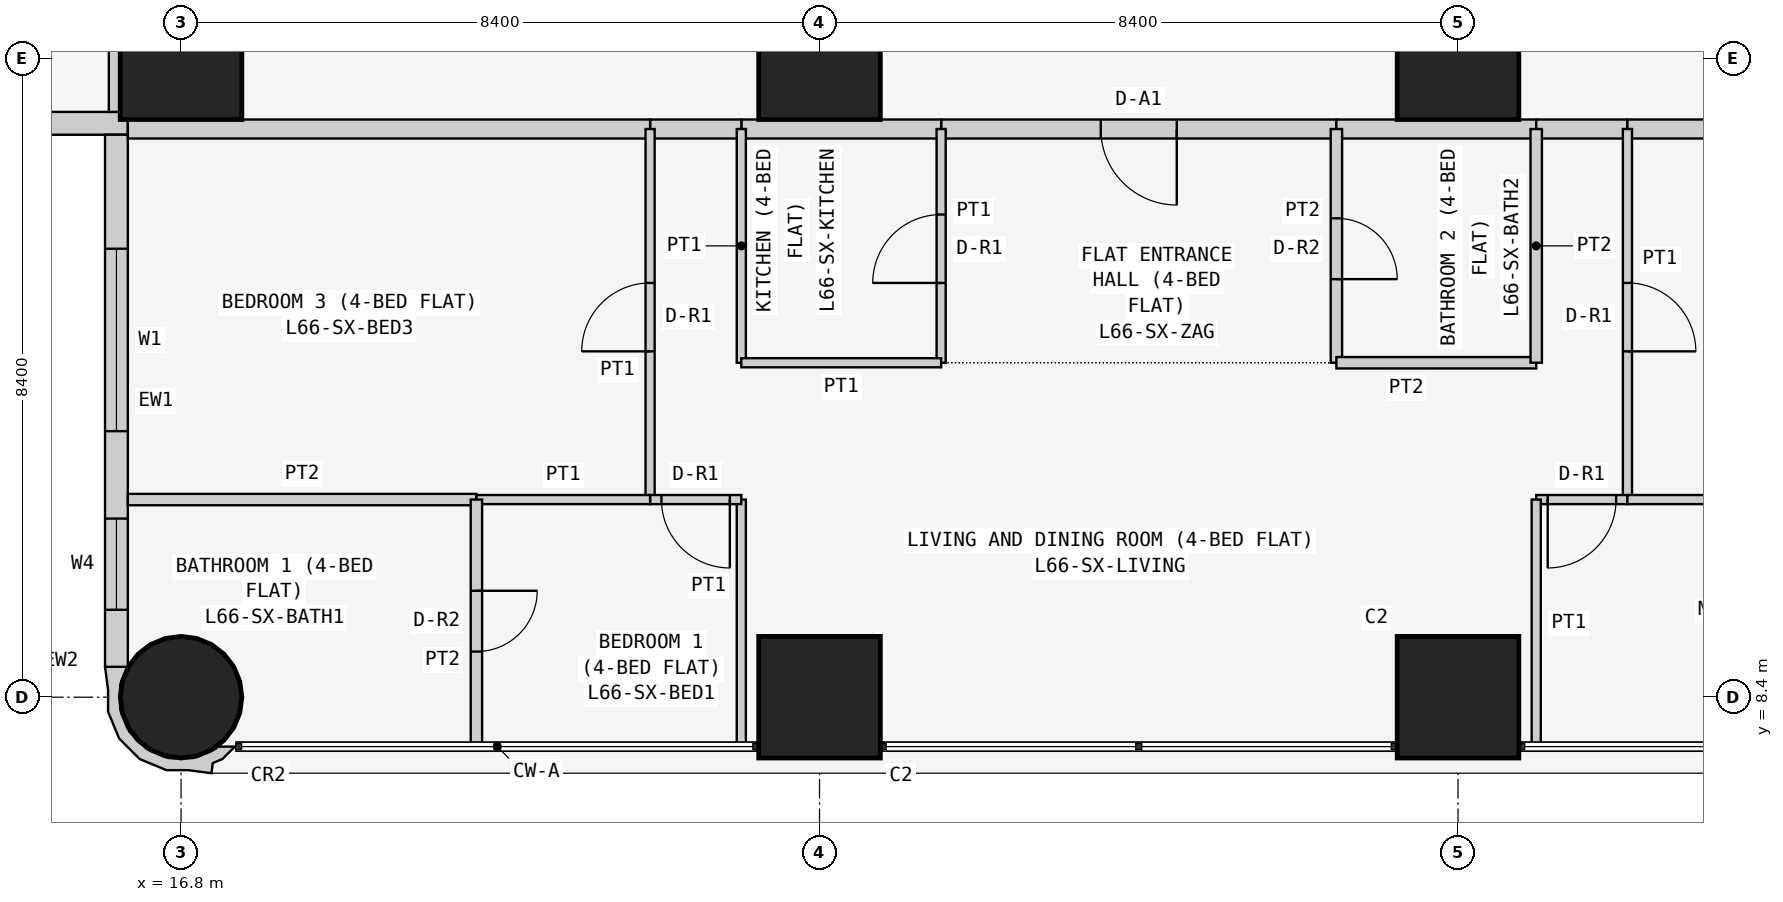
"""IFC4 building model, lengths in metres.
Left out: names, types, materials, properties, quantities, classifications, styles, units other than length and angle.
Written with IfcOpenShell. Run it as: python <this file> out.ifc"""

import sys

from ifc_helpers import new_model, si_unit, direction, frame, frame_2d, origin, origin_2d, place, context, subcontext, project, spatial, polyline, rectangle, circle, outline, extrude, element, fill, save


model = new_model("IFC4")
c1 = context("Model", 3, precision=1e-05, world=origin(), true_north=direction((0.0, 1.0)))
c2 = subcontext(c1, "Body", "Model", "MODEL_VIEW")
j1 = project(units=[si_unit("LENGTHUNIT", "METRE"), si_unit("PLANEANGLEUNIT", "RADIAN")], contexts=[c1])
p1 = place(None, origin())
s1 = spatial("IfcSite", under=j1, at=p1, CompositionType="ELEMENT")
p2 = place(p1, origin())
s2 = spatial("IfcBuilding", under=s1, at=p2, CompositionType="ELEMENT")
p3 = place(p2, frame((0.0, 0.0, 254.1)))
s3 = spatial("IfcBuildingStorey", under=s2, at=p3, CompositionType="ELEMENT", Elevation=254.1)
p4 = place(p3, frame((16.8, 8.4, 0.0), z_axis=(0.0, 0.0, 1.0), x_axis=(1.0, 0.0, 0.0)))
e1 = element("IfcColumn", 1, at=p4, inside=s3, PredefinedType="COLUMN", context=c2, shape_type="SweptSolid", body=[
    extrude(circle(Radius=0.8, at=origin_2d()), origin(), (0.0, 0.0, 1.0), 3.6),
])
for number, where, z_axis, x_axis in (
    (2, (16.8, 16.8, 0.0), (0.0, 0.0, 1.0), (1.0, 0.0, 0.0)),
    (3, (25.2, 8.4, 0.0), (0.0, 0.0, 1.0), (1.0, 0.0, 0.0)),
    (4, (25.2, 16.8, 0.0), (0.0, 0.0, 1.0), (1.0, 0.0, 0.0)),
    (5, (33.6, 8.4, 0.0), (0.0, 0.0, 1.0), (1.0, 0.0, 0.0)),
    (6, (33.6, 16.8, 0.0), (0.0, 0.0, 1.0), (1.0, 0.0, 0.0)),
):
    element("IfcColumn", number, at=place(p3, frame(where, z_axis=z_axis, x_axis=x_axis)), inside=s3, PredefinedType="COLUMN", context=c2, shape_type="SweptSolid", body=[
        extrude(rectangle(XDim=1.6, YDim=1.6, at=origin_2d()), origin(), (0.0, 0.0, 1.0), 3.6),
    ])
p5 = place(p3, frame((8.8, 15.95, 0.0), z_axis=(0.0, 0.0, 1.0), x_axis=(1.0, 0.0, 0.0)))
e7 = element("IfcWall", 7, at=p5, inside=s3, PredefinedType="SOLIDWALL", context=c2, shape_type="SweptSolid", body=[
    extrude(rectangle(XDim=7.3, YDim=0.3, at=frame_2d((3.65, 0.0))), origin(), (0.0, 0.0, 1.0), 3.45),
])
p6 = place(p5, frame((3.1, 0.0, 0.9)))
e8 = element("IfcOpeningElement", 8, at=p6, cuts=e7, PredefinedType="OPENING", context=c2, shape_type="SweptSolid", body=[
    extrude(rectangle(XDim=2.4, YDim=1.5, at=frame_2d((1.2, 0.75))), frame((0.0, 0.16, 0.0), z_axis=(0.0, -1.0, 0.0), x_axis=(1.0, 0.0, 0.0)), (0.0, 0.0, 1.0), 0.32),
])
p7 = place(p5, frame((0.75, 0.0, 0.9)))
e9 = element("IfcOpeningElement", 9, at=p7, cuts=e7, PredefinedType="OPENING", context=c2, shape_type="SweptSolid", body=[
    extrude(rectangle(XDim=1.2, YDim=1.5, at=frame_2d((0.6, 0.75))), frame((0.0, 0.16, 0.0), z_axis=(0.0, -1.0, 0.0), x_axis=(1.0, 0.0, 0.0)), (0.0, 0.0, 1.0), 0.32),
])
p8 = place(p3, frame((15.95, 15.8, 0.0), z_axis=(0.0, 0.0, 1.0), x_axis=(0.0, -1.0, 0.0)))
e10 = element("IfcWall", 10, at=p8, inside=s3, PredefinedType="SOLIDWALL", context=c2, shape_type="SweptSolid", body=[
    extrude(rectangle(XDim=7.0, YDim=0.3, at=frame_2d((3.5, 0.0))), origin(), (0.0, 0.0, 1.0), 3.45),
])
p9 = place(p8, frame((1.5, 0.0, 0.9)))
e11 = element("IfcOpeningElement", 11, at=p9, cuts=e10, PredefinedType="OPENING", context=c2, shape_type="SweptSolid", body=[
    extrude(rectangle(XDim=2.4, YDim=1.5, at=frame_2d((1.2, 0.75))), frame((0.0, 0.16, 0.0), z_axis=(0.0, -1.0, 0.0), x_axis=(1.0, 0.0, 0.0)), (0.0, 0.0, 1.0), 0.32),
])
p10 = place(p8, frame((5.05, 0.0, 0.9)))
e12 = element("IfcOpeningElement", 12, at=p10, cuts=e10, PredefinedType="OPENING", context=c2, shape_type="SweptSolid", body=[
    extrude(rectangle(XDim=1.2, YDim=1.5, at=frame_2d((0.6, 0.75))), frame((0.0, 0.16, 0.0), z_axis=(0.0, -1.0, 0.0), x_axis=(1.0, 0.0, 0.0)), (0.0, 0.0, 1.0), 0.32),
])
p11 = place(p3, frame((15.983, 8.727, 0.0), z_axis=(0.0, 0.0, 1.0), x_axis=(-0.343276641956, -0.93923434088, 0.0)))
e13 = element("IfcWall", 13, at=p11, inside=s3, PredefinedType="SOLIDWALL", context=c2, shape_type="SweptSolid", body=[
    extrude(outline(polyline([(0.829, 1.599), (0.697, 1.569), (0.604, 1.67), (0.394, 1.767), (0.471, 1.556), (0.509, 1.539), (0.724, 1.304), (0.833, 1.005), (0.82, 0.686), (0.686, 0.397), (0.451, 0.182), (0.152, 0.073), (-0.116, 0.084), (-0.127, 0.078), (-0.146, 0.071), (-0.006, -0.197), (0.266, -0.055), (0.535, 0.044), (0.817, 0.302), (0.978, 0.648), (0.994, 1.03), (0.895, 1.3), (0.829, 1.599)])), origin(), (0.0, 0.0, 1.0), 3.45),
])
p12 = place(p3, frame((32.0, 15.875, 0.0), z_axis=(0.0, 0.0, 1.0), x_axis=(-1.0, 0.0, 0.0)))
e14 = element("IfcWall", 14, at=p12, inside=s3, PredefinedType="PARTITIONING", context=c2, shape_type="SweptSolid", body=[
    extrude(rectangle(XDim=5.2, YDim=0.25, at=frame_2d((2.6, 0.0))), origin(), (0.0, 0.0, 1.0), 3.45),
])
p13 = place(p12, frame((2.1, 0.0, 0.0)))
e15 = element("IfcOpeningElement", 15, at=p13, cuts=e14, PredefinedType="OPENING", context=c2, shape_type="SweptSolid", body=[
    extrude(rectangle(XDim=1.0, YDim=2.1, at=frame_2d((0.5, 1.05))), frame((0.0, 0.135, 0.0), z_axis=(0.0, -1.0, 0.0), x_axis=(1.0, 0.0, 0.0)), (0.0, 0.0, 1.0), 0.27),
])
p14 = place(p3, frame((34.629, 15.875, 0.0), z_axis=(0.0, 0.0, 1.0), x_axis=(-1.0, 0.0, 0.0)))
e16 = element("IfcWall", 16, at=p14, inside=s3, PredefinedType="PARTITIONING", context=c2, shape_type="SweptSolid", body=[
    extrude(rectangle(XDim=2.629, YDim=0.25, at=frame_2d((1.314, 0.0))), origin(), (0.0, 0.0, 1.0), 3.45),
])
p15 = place(p3, frame((26.8, 15.875, 0.0), z_axis=(0.0, 0.0, 1.0), x_axis=(-1.0, 0.0, 0.0)))
e17 = element("IfcWall", 17, at=p15, inside=s3, PredefinedType="PARTITIONING", context=c2, shape_type="SweptSolid", body=[
    extrude(rectangle(XDim=2.629, YDim=0.25, at=frame_2d((1.314, 0.0))), origin(), (0.0, 0.0, 1.0), 3.45),
])
p16 = place(p3, frame((24.171, 15.875, 0.0), z_axis=(0.0, 0.0, 1.0), x_axis=(-1.0, 0.0, 0.0)))
e18 = element("IfcWall", 18, at=p16, inside=s3, PredefinedType="PARTITIONING", context=c2, shape_type="SweptSolid", body=[
    extrude(rectangle(XDim=1.2, YDim=0.25, at=frame_2d((0.6, 0.0))), origin(), (0.0, 0.0, 1.0), 3.45),
])
p17 = place(p3, frame((35.829, 15.875, 0.0), z_axis=(0.0, 0.0, 1.0), x_axis=(-1.0, 0.0, 0.0)))
e19 = element("IfcWall", 19, at=p17, inside=s3, PredefinedType="PARTITIONING", context=c2, shape_type="SweptSolid", body=[
    extrude(rectangle(XDim=1.2, YDim=0.25, at=frame_2d((0.6, 0.0))), origin(), (0.0, 0.0, 1.0), 3.45),
])
for number, where, z_axis, x_axis in (
    (20, (42.7, 15.875, 0.0), (0.0, 0.0, 1.0), (-1.0, 0.0, 0.0)),
    (21, (22.971, 15.875, 0.0), (0.0, 0.0, 1.0), (-1.0, 0.0, 0.0)),
):
    element("IfcWall", number, at=place(p3, frame(where, z_axis=z_axis, x_axis=x_axis)), inside=s3, PredefinedType="PARTITIONING", context=c2, shape_type="SweptSolid", body=[
        extrude(rectangle(XDim=6.871, YDim=0.25, at=frame_2d((3.436, 0.0))), origin(), (0.0, 0.0, 1.0), 3.45),
    ])
p18 = place(p3, frame((15.925, 16.1, 0.0), z_axis=(0.0, 0.0, 1.0), x_axis=(0.0, 1.0, 0.0)))
e22 = element("IfcWall", 22, at=p18, inside=s3, PredefinedType="PARTITIONING", context=c2, shape_type="SweptSolid", body=[
    extrude(rectangle(XDim=11.557, YDim=0.15, at=frame_2d((5.778, 0.0))), origin(), (0.0, 0.0, 1.0), 3.45),
])
p19 = place(p3, frame((32.0, 12.8, 0.0), z_axis=(0.0, 0.0, 1.0), x_axis=(0.0, 1.0, 0.0)))
e23 = element("IfcWall", 23, at=p19, inside=s3, PredefinedType="PARTITIONING", context=c2, shape_type="SweptSolid", body=[
    extrude(rectangle(XDim=3.075, YDim=0.15, at=frame_2d((1.538, 0.0))), origin(), (0.0, 0.0, 1.0), 3.45),
])
p20 = place(p19, frame((1.1, 0.0, 0.0)))
e24 = element("IfcOpeningElement", 24, at=p20, cuts=e23, PredefinedType="OPENING", context=c2, shape_type="SweptSolid", body=[
    extrude(rectangle(XDim=0.8, YDim=2.1, at=frame_2d((0.4, 1.05))), frame((0.0, 0.085, 0.0), z_axis=(0.0, -1.0, 0.0), x_axis=(1.0, 0.0, 0.0)), (0.0, 0.0, 1.0), 0.17),
])
p21 = place(p3, frame((26.8, 15.875, 0.0), z_axis=(0.0, 0.0, 1.0), x_axis=(0.0, -1.0, 0.0)))
e25 = element("IfcWall", 25, at=p21, inside=s3, PredefinedType="PARTITIONING", context=c2, shape_type="SweptSolid", body=[
    extrude(rectangle(XDim=3.075, YDim=0.12, at=frame_2d((1.538, 0.0))), origin(), (0.0, 0.0, 1.0), 3.45),
])
p22 = place(p21, frame((1.125, 0.0, 0.0)))
e26 = element("IfcOpeningElement", 26, at=p22, cuts=e25, PredefinedType="OPENING", context=c2, shape_type="SweptSolid", body=[
    extrude(rectangle(XDim=0.9, YDim=2.1, at=frame_2d((0.45, 1.05))), frame((0.0, 0.07, 0.0), z_axis=(0.0, -1.0, 0.0), x_axis=(1.0, 0.0, 0.0)), (0.0, 0.0, 1.0), 0.14),
])
p23 = place(p3, frame((32.0, 12.8, 0.0), z_axis=(0.0, 0.0, 1.0), x_axis=(1.0, 0.0, 0.0)))
e27 = element("IfcWall", 27, at=p23, inside=s3, PredefinedType="PARTITIONING", context=c2, shape_type="SweptSolid", body=[
    extrude(rectangle(XDim=2.629, YDim=0.15, at=frame_2d((1.314, 0.0))), origin(), (0.0, 0.0, 1.0), 3.45),
])
p24 = place(p3, frame((34.629, 12.8, 0.0), z_axis=(0.0, 0.0, 1.0), x_axis=(0.0, 1.0, 0.0)))
e28 = element("IfcWall", 28, at=p24, inside=s3, PredefinedType="PARTITIONING", context=c2, shape_type="SweptSolid", body=[
    extrude(rectangle(XDim=3.075, YDim=0.15, at=frame_2d((1.538, 0.0))), origin(), (0.0, 0.0, 1.0), 3.45),
])
p25 = place(p3, frame((24.171, 15.875, 0.0), z_axis=(0.0, 0.0, 1.0), x_axis=(0.0, -1.0, 0.0)))
e29 = element("IfcWall", 29, at=p25, inside=s3, PredefinedType="PARTITIONING", context=c2, shape_type="SweptSolid", body=[
    extrude(rectangle(XDim=3.075, YDim=0.12, at=frame_2d((1.538, 0.0))), origin(), (0.0, 0.0, 1.0), 3.45),
])
p26 = place(p3, frame((24.171, 12.8, 0.0), z_axis=(0.0, 0.0, 1.0), x_axis=(1.0, 0.0, 0.0)))
e30 = element("IfcWall", 30, at=p26, inside=s3, PredefinedType="PARTITIONING", context=c2, shape_type="SweptSolid", body=[
    extrude(rectangle(XDim=2.629, YDim=0.12, at=frame_2d((1.314, 0.0))), origin(), (0.0, 0.0, 1.0), 3.45),
])
p27 = place(p3, frame((35.829, 15.875, 0.0), z_axis=(0.0, 0.0, 1.0), x_axis=(0.0, -1.0, 0.0)))
e31 = element("IfcWall", 31, at=p27, inside=s3, PredefinedType="PARTITIONING", context=c2, shape_type="SweptSolid", body=[
    extrude(rectangle(XDim=4.875, YDim=0.12, at=frame_2d((2.438, 0.0))), origin(), (0.0, 0.0, 1.0), 3.45),
])
p28 = place(p27, frame((2.025, 0.0, 0.0)))
e32 = element("IfcOpeningElement", 32, at=p28, cuts=e31, PredefinedType="OPENING", context=c2, shape_type="SweptSolid", body=[
    extrude(rectangle(XDim=0.9, YDim=2.1, at=frame_2d((0.45, 1.05))), frame((0.0, 0.07, 0.0), z_axis=(0.0, -1.0, 0.0), x_axis=(1.0, 0.0, 0.0)), (0.0, 0.0, 1.0), 0.14),
])
p29 = place(p3, frame((35.829, 11.0, 0.0), z_axis=(0.0, 0.0, 1.0), x_axis=(-1.0, 0.0, 0.0)))
e33 = element("IfcWall", 33, at=p29, inside=s3, PredefinedType="PARTITIONING", context=c2, shape_type="SweptSolid", body=[
    extrude(rectangle(XDim=1.2, YDim=0.12, at=frame_2d((0.6, 0.0))), origin(), (0.0, 0.0, 1.0), 3.45),
])
p30 = place(p29, frame((0.149, 0.0, 0.0)))
e34 = element("IfcOpeningElement", 34, at=p30, cuts=e33, PredefinedType="OPENING", context=c2, shape_type="SweptSolid", body=[
    extrude(rectangle(XDim=0.9, YDim=2.1, at=frame_2d((0.45, 1.05))), frame((0.0, 0.07, 0.0), z_axis=(0.0, -1.0, 0.0), x_axis=(1.0, 0.0, 0.0)), (0.0, 0.0, 1.0), 0.14),
])
p31 = place(p3, frame((34.629, 11.0, 0.0), z_axis=(0.0, 0.0, 1.0), x_axis=(0.0, -1.0, 0.0)))
e35 = element("IfcWall", 35, at=p31, inside=s3, PredefinedType="PARTITIONING", context=c2, shape_type="SweptSolid", body=[
    extrude(rectangle(XDim=3.25, YDim=0.12, at=frame_2d((1.625, 0.0))), origin(), (0.0, 0.0, 1.0), 3.45),
])
p32 = place(p3, frame((22.971, 11.0, 0.0), z_axis=(0.0, 0.0, 1.0), x_axis=(0.0, 1.0, 0.0)))
e36 = element("IfcWall", 36, at=p32, inside=s3, PredefinedType="PARTITIONING", context=c2, shape_type="SweptSolid", body=[
    extrude(rectangle(XDim=4.875, YDim=0.12, at=frame_2d((2.438, 0.0))), origin(), (0.0, 0.0, 1.0), 3.45),
])
p33 = place(p32, frame((1.95, 0.0, 0.0)))
e37 = element("IfcOpeningElement", 37, at=p33, cuts=e36, PredefinedType="OPENING", context=c2, shape_type="SweptSolid", body=[
    extrude(rectangle(XDim=0.9, YDim=2.1, at=frame_2d((0.45, 1.05))), frame((0.0, 0.07, 0.0), z_axis=(0.0, -1.0, 0.0), x_axis=(1.0, 0.0, 0.0)), (0.0, 0.0, 1.0), 0.14),
])
p34 = place(p3, frame((24.171, 7.75, 0.0), z_axis=(0.0, 0.0, 1.0), x_axis=(0.0, 1.0, 0.0)))
e38 = element("IfcWall", 38, at=p34, inside=s3, PredefinedType="PARTITIONING", context=c2, shape_type="SweptSolid", body=[
    extrude(rectangle(XDim=3.25, YDim=0.12, at=frame_2d((1.625, 0.0))), origin(), (0.0, 0.0, 1.0), 3.45),
])
p35 = place(p3, frame((24.171, 11.0, 0.0), z_axis=(0.0, 0.0, 1.0), x_axis=(-1.0, 0.0, 0.0)))
e39 = element("IfcWall", 39, at=p35, inside=s3, PredefinedType="PARTITIONING", context=c2, shape_type="SweptSolid", body=[
    extrude(rectangle(XDim=1.2, YDim=0.12, at=frame_2d((0.6, 0.0))), origin(), (0.0, 0.0, 1.0), 3.45),
])
p36 = place(p35, frame((0.151, 0.0, 0.0)))
e40 = element("IfcOpeningElement", 40, at=p36, cuts=e39, PredefinedType="OPENING", context=c2, shape_type="SweptSolid", body=[
    extrude(rectangle(XDim=0.9, YDim=2.1, at=frame_2d((0.45, 1.05))), frame((0.0, 0.07, 0.0), z_axis=(0.0, -1.0, 0.0), x_axis=(1.0, 0.0, 0.0)), (0.0, 0.0, 1.0), 0.14),
])
p37 = place(p3, frame((35.829, 11.0, 0.0), z_axis=(0.0, 0.0, 1.0), x_axis=(1.0, 0.0, 0.0)))
e41 = element("IfcWall", 41, at=p37, inside=s3, PredefinedType="PARTITIONING", context=c2, shape_type="SweptSolid", body=[
    extrude(rectangle(XDim=6.871, YDim=0.12, at=frame_2d((3.436, 0.0))), origin(), (0.0, 0.0, 1.0), 3.45),
])
p38 = place(p3, frame((16.1, 11.0, 0.0), z_axis=(0.0, 0.0, 1.0), x_axis=(1.0, 0.0, 0.0)))
e42 = element("IfcWall", 42, at=p38, inside=s3, PredefinedType="PARTITIONING", context=c2, shape_type="SweptSolid", body=[
    extrude(rectangle(XDim=4.586, YDim=0.15, at=frame_2d((2.293, 0.0))), origin(), (0.0, 0.0, 1.0), 3.45),
])
p39 = place(p3, frame((20.686, 11.0, 0.0), z_axis=(0.0, 0.0, 1.0), x_axis=(1.0, 0.0, 0.0)))
e43 = element("IfcWall", 43, at=p39, inside=s3, PredefinedType="PARTITIONING", context=c2, shape_type="SweptSolid", body=[
    extrude(rectangle(XDim=2.285, YDim=0.12, at=frame_2d((1.143, 0.0))), origin(), (0.0, 0.0, 1.0), 3.45),
])
p40 = place(p3, frame((20.686, 7.75, 0.0), z_axis=(0.0, 0.0, 1.0), x_axis=(0.0, 1.0, 0.0)))
e44 = element("IfcWall", 44, at=p40, inside=s3, PredefinedType="PARTITIONING", context=c2, shape_type="SweptSolid", body=[
    extrude(rectangle(XDim=3.25, YDim=0.15, at=frame_2d((1.625, 0.0))), origin(), (0.0, 0.0, 1.0), 3.45),
])
p41 = place(p40, frame((1.25, 0.0, 0.0)))
e45 = element("IfcOpeningElement", 45, at=p41, cuts=e44, PredefinedType="OPENING", context=c2, shape_type="SweptSolid", body=[
    extrude(rectangle(XDim=0.8, YDim=2.1, at=frame_2d((0.4, 1.05))), frame((0.0, 0.085, 0.0), z_axis=(0.0, -1.0, 0.0), x_axis=(1.0, 0.0, 0.0)), (0.0, 0.0, 1.0), 0.17),
])
p42 = place(p9, origin())
e46 = element("IfcWindow", 46, at=p42, inside=s3, PartitioningType="SINGLE_PANEL", PredefinedType="WINDOW", context=c2, shape_type="SweptSolid", body=[
    extrude(rectangle(XDim=2.4, YDim=1.5, at=frame_2d((1.2, 0.75))), frame((0.0, 0.03, 0.0), z_axis=(0.0, -1.0, 0.0), x_axis=(1.0, 0.0, 0.0)), (0.0, 0.0, 1.0), 0.06),
])
fill(e11, e46)
p43 = place(p10, origin())
e47 = element("IfcWindow", 47, at=p43, inside=s3, PartitioningType="SINGLE_PANEL", PredefinedType="WINDOW", context=c2, shape_type="SweptSolid", body=[
    extrude(rectangle(XDim=1.2, YDim=1.5, at=frame_2d((0.6, 0.75))), frame((0.0, 0.03, 0.0), z_axis=(0.0, -1.0, 0.0), x_axis=(1.0, 0.0, 0.0)), (0.0, 0.0, 1.0), 0.06),
])
fill(e12, e47)
p44 = place(p13, origin())
e48 = element("IfcDoor", 48, at=p44, inside=s3, OperationType="SINGLE_SWING_LEFT", PredefinedType="DOOR", context=c2, shape_type="SweptSolid", body=[
    extrude(rectangle(XDim=1.0, YDim=2.1, at=frame_2d((0.5, 1.05))), frame((0.0, 0.025, 0.0), z_axis=(0.0, -1.0, 0.0), x_axis=(1.0, 0.0, 0.0)), (0.0, 0.0, 1.0), 0.05),
])
fill(e15, e48)
p45 = place(p20, frame((0.8, 0.0, 0.0), z_axis=(0.0, 0.0, 1.0), x_axis=(-1.0, 0.0, 0.0)))
e49 = element("IfcDoor", 49, at=p45, inside=s3, OperationType="SINGLE_SWING_RIGHT", PredefinedType="DOOR", context=c2, shape_type="SweptSolid", body=[
    extrude(rectangle(XDim=0.8, YDim=2.1, at=frame_2d((0.4, 1.05))), frame((0.0, 0.025, 0.0), z_axis=(0.0, -1.0, 0.0), x_axis=(1.0, 0.0, 0.0)), (0.0, 0.0, 1.0), 0.05),
])
fill(e24, e49)
p46 = place(p22, frame((0.9, 0.0, 0.0), z_axis=(0.0, 0.0, 1.0), x_axis=(-1.0, 0.0, 0.0)))
e50 = element("IfcDoor", 50, at=p46, inside=s3, OperationType="SINGLE_SWING_LEFT", PredefinedType="DOOR", context=c2, shape_type="SweptSolid", body=[
    extrude(rectangle(XDim=0.9, YDim=2.1, at=frame_2d((0.45, 1.05))), frame((0.0, 0.025, 0.0), z_axis=(0.0, -1.0, 0.0), x_axis=(1.0, 0.0, 0.0)), (0.0, 0.0, 1.0), 0.05),
])
fill(e26, e50)
p47 = place(p28, origin())
e51 = element("IfcDoor", 51, at=p47, inside=s3, OperationType="SINGLE_SWING_RIGHT", PredefinedType="DOOR", context=c2, shape_type="SweptSolid", body=[
    extrude(rectangle(XDim=0.9, YDim=2.1, at=frame_2d((0.45, 1.05))), frame((0.0, 0.025, 0.0), z_axis=(0.0, -1.0, 0.0), x_axis=(1.0, 0.0, 0.0)), (0.0, 0.0, 1.0), 0.05),
])
fill(e32, e51)
p48 = place(p30, origin())
e52 = element("IfcDoor", 52, at=p48, inside=s3, OperationType="SINGLE_SWING_RIGHT", PredefinedType="DOOR", context=c2, shape_type="SweptSolid", body=[
    extrude(rectangle(XDim=0.9, YDim=2.1, at=frame_2d((0.45, 1.05))), frame((0.0, 0.025, 0.0), z_axis=(0.0, -1.0, 0.0), x_axis=(1.0, 0.0, 0.0)), (0.0, 0.0, 1.0), 0.05),
])
fill(e34, e52)
p49 = place(p33, origin())
e53 = element("IfcDoor", 53, at=p49, inside=s3, OperationType="SINGLE_SWING_LEFT", PredefinedType="DOOR", context=c2, shape_type="SweptSolid", body=[
    extrude(rectangle(XDim=0.9, YDim=2.1, at=frame_2d((0.45, 1.05))), frame((0.0, 0.025, 0.0), z_axis=(0.0, -1.0, 0.0), x_axis=(1.0, 0.0, 0.0)), (0.0, 0.0, 1.0), 0.05),
])
fill(e37, e53)
p50 = place(p36, origin())
e54 = element("IfcDoor", 54, at=p50, inside=s3, OperationType="SINGLE_SWING_LEFT", PredefinedType="DOOR", context=c2, shape_type="SweptSolid", body=[
    extrude(rectangle(XDim=0.9, YDim=2.1, at=frame_2d((0.45, 1.05))), frame((0.0, 0.025, 0.0), z_axis=(0.0, -1.0, 0.0), x_axis=(1.0, 0.0, 0.0)), (0.0, 0.0, 1.0), 0.05),
])
fill(e40, e54)
p51 = place(p41, frame((0.8, 0.0, 0.0), z_axis=(0.0, 0.0, 1.0), x_axis=(-1.0, 0.0, 0.0)))
e55 = element("IfcDoor", 55, at=p51, inside=s3, OperationType="SINGLE_SWING_LEFT", PredefinedType="DOOR", context=c2, shape_type="SweptSolid", body=[
    extrude(rectangle(XDim=0.8, YDim=2.1, at=frame_2d((0.4, 1.05))), frame((0.0, 0.025, 0.0), z_axis=(0.0, -1.0, 0.0), x_axis=(1.0, 0.0, 0.0)), (0.0, 0.0, 1.0), 0.05),
])
fill(e45, e55)
save(model, sys.argv[1])
